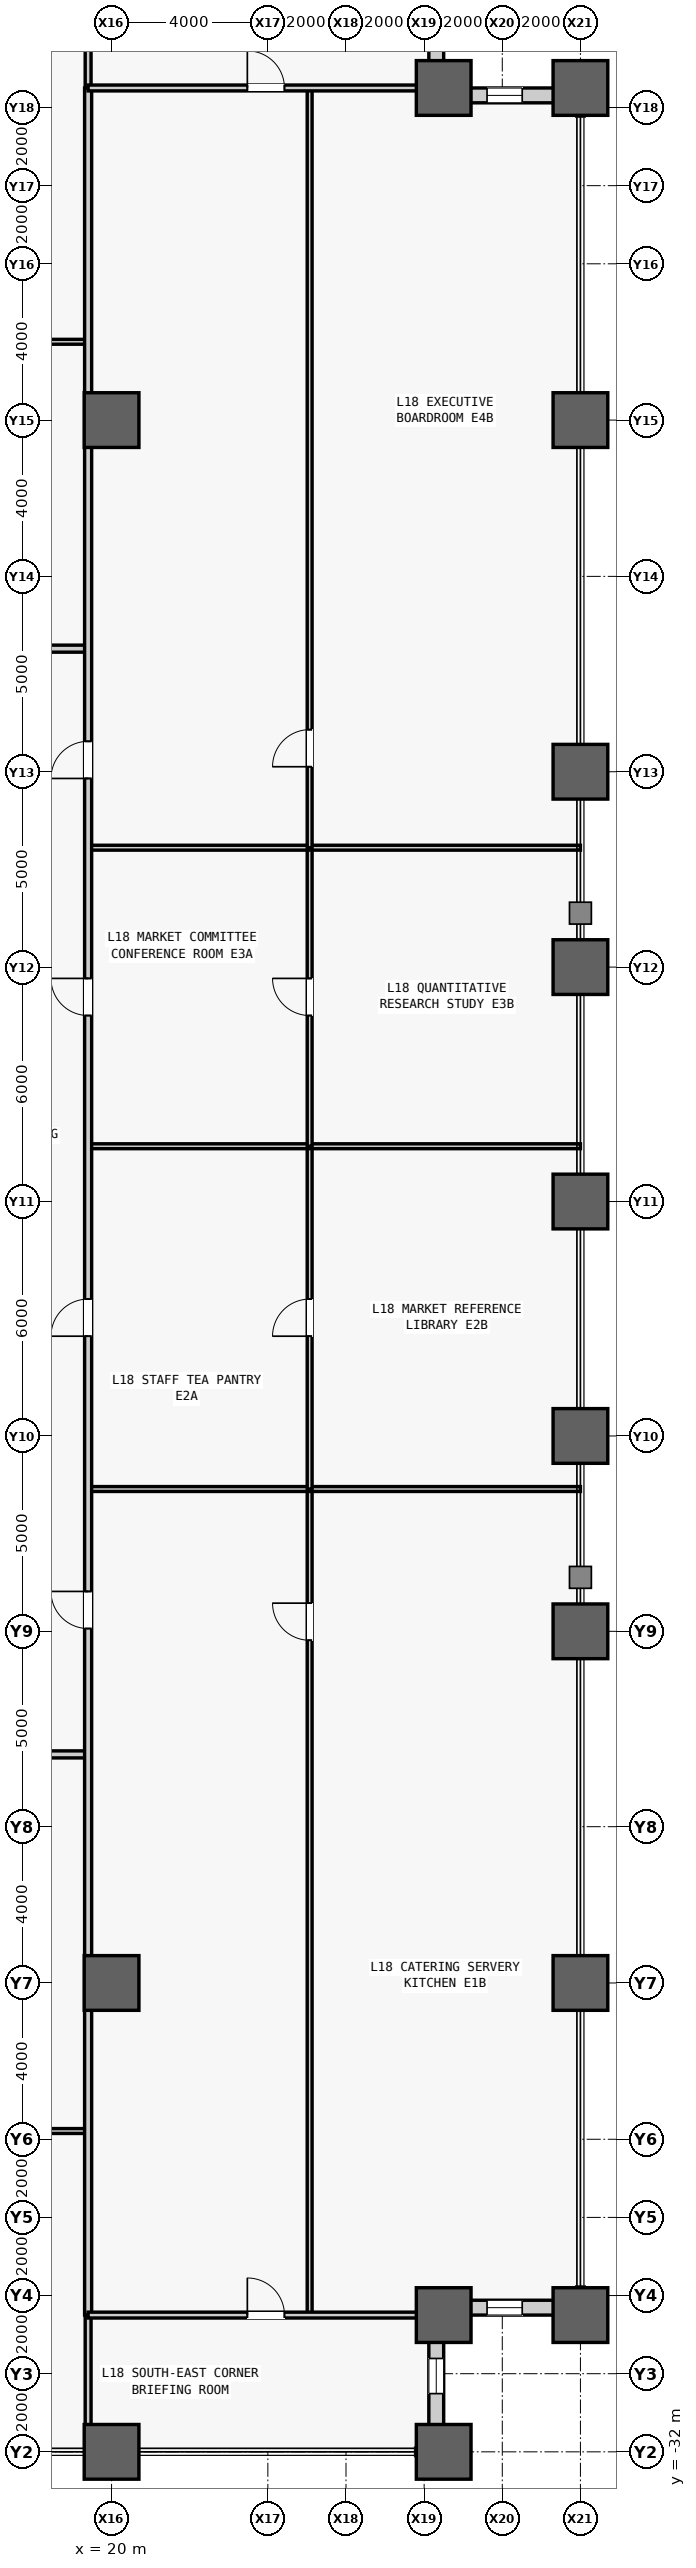
"""IFC4 building model, lengths in metres.
Left out: names, types, materials, properties, quantities, classifications, styles, units other than length and angle.
Written with IfcOpenShell. Run it as: python <this file> out.ifc"""

import sys

from ifc_helpers import new_model, si_unit, direction, frame, frame_2d, origin, origin_2d, place, context, subcontext, project, spatial, rectangle, hollow_rectangle, extrude, source, transform, mapped, element, fill, save


model = new_model("IFC4")
c1 = context("Model", 3, precision=1e-05, world=origin(), true_north=direction((0.0, 1.0)))
c2 = subcontext(c1, "Body", "Model", "MODEL_VIEW")
j1 = project(units=[si_unit("LENGTHUNIT", "METRE"), si_unit("PLANEANGLEUNIT", "RADIAN")], contexts=[c1])
p1 = place(None, origin())
s1 = spatial("IfcSite", under=j1, at=p1, CompositionType="ELEMENT")
p2 = place(p1, origin())
s2 = spatial("IfcBuilding", under=s1, at=p2, CompositionType="ELEMENT")
p3 = place(p2, frame((0.0, 0.0, 83.0)))
s3 = spatial("IfcBuildingStorey", under=s2, at=p3, CompositionType="ELEMENT", Elevation=83.0)
m1 = source(origin(), c2, "Body", "SweptSolid", [
    extrude(hollow_rectangle(XDim=1.4, YDim=1.4, WallThickness=0.075, at=origin_2d()), origin(), (0.0, 0.0, 1.0), 4.2),
])
for number, where, z_axis, x_axis in (
    (1, (20.0, -32.0, 0.0), (0.0, 0.0, 1.0), (1.0, 0.0, 0.0)),
    (2, (20.0, -20.0, 0.0), (0.0, 0.0, 1.0), (1.0, 0.0, 0.0)),
    (3, (20.0, 20.0, 0.0), (0.0, 0.0, 1.0), (1.0, 0.0, 0.0)),
    (4, (28.5, -32.0, 0.0), (0.0, 0.0, 1.0), (1.0, 0.0, 0.0)),
    (5, (28.5, -28.5, 0.0), (0.0, 0.0, 1.0), (1.0, 0.0, 0.0)),
    (6, (28.5, 28.5, 0.0), (0.0, 0.0, 1.0), (1.0, 0.0, 0.0)),
    (7, (32.0, -28.5, 0.0), (0.0, 0.0, 1.0), (1.0, 0.0, 0.0)),
    (8, (32.0, -20.0, 0.0), (0.0, 0.0, 1.0), (1.0, 0.0, 0.0)),
    (9, (32.0, -11.0, 0.0), (0.0, 0.0, 1.0), (1.0, 0.0, 0.0)),
    (10, (32.0, -6.0, 0.0), (0.0, 0.0, 1.0), (1.0, 0.0, 0.0)),
    (11, (32.0, 0.0, 0.0), (0.0, 0.0, 1.0), (1.0, 0.0, 0.0)),
    (12, (32.0, 6.0, 0.0), (0.0, 0.0, 1.0), (1.0, 0.0, 0.0)),
    (13, (32.0, 11.0, 0.0), (0.0, 0.0, 1.0), (1.0, 0.0, 0.0)),
    (14, (32.0, 20.0, 0.0), (0.0, 0.0, 1.0), (1.0, 0.0, 0.0)),
    (15, (32.0, 28.5, 0.0), (0.0, 0.0, 1.0), (1.0, 0.0, 0.0)),
):
    element("IfcColumn", number, at=place(p3, frame(where, z_axis=z_axis, x_axis=x_axis)), inside=s3, PredefinedType="COLUMN", context=c2, shape_type="MappedRepresentation", body=[
        mapped(m1, transform((0.0, 0.0, 0.0), scale=1.0)),
    ])
m2 = source(origin(), c2, "Body", "SweptSolid", [
    extrude(rectangle(XDim=3.12, YDim=0.38, at=frame_2d((1.56, 0.0))), origin(), (0.0, 0.0, 1.0), 3.245),
])
p4 = place(p3, frame((28.31, -31.62, 0.0), z_axis=(0.0, 0.0, 1.0), x_axis=(0.0, 1.0, 0.0)))
e16 = element("IfcWall", 16, at=p4, inside=s3, PredefinedType="STANDARD", context=c2, shape_type="MappedRepresentation", body=[
    mapped(m2, transform((0.0, 0.0, 0.0), scale=1.0)),
])
m3 = source(origin(), c2, "Body", "SweptSolid", [
    extrude(rectangle(XDim=0.9, YDim=2.4, at=frame_2d((0.45, 1.2))), frame((0.0, 0.2, 0.0), z_axis=(0.0, -1.0, 0.0), x_axis=(1.0, 0.0, 0.0)), (0.0, 0.0, 1.0), 0.4),
])
p5 = place(p4, frame((1.11, 0.0, 0.5)))
e17 = element("IfcOpeningElement", 17, at=p5, cuts=e16, PredefinedType="OPENING", context=c2, shape_type="MappedRepresentation", body=[
    mapped(m3, transform((0.0, 0.0, 0.0), scale=1.0)),
])
p6 = place(p3, frame((28.5, -28.31, 0.0), z_axis=(0.0, 0.0, 1.0), x_axis=(1.0, 0.0, 0.0)))
e18 = element("IfcWall", 18, at=p6, inside=s3, PredefinedType="STANDARD", context=c2, shape_type="MappedRepresentation", body=[
    mapped(m2, transform((0.0, 0.0, 0.0), scale=1.0)),
])
p7 = place(p6, frame((1.11, 0.0, 0.5)))
e19 = element("IfcOpeningElement", 19, at=p7, cuts=e18, PredefinedType="OPENING", context=c2, shape_type="MappedRepresentation", body=[
    mapped(m3, transform((0.0, 0.0, 0.0), scale=1.0)),
])
p8 = place(p3, frame((28.5, 28.31, 0.0), z_axis=(0.0, 0.0, 1.0), x_axis=(1.0, 0.0, 0.0)))
e20 = element("IfcWall", 20, at=p8, inside=s3, PredefinedType="STANDARD", context=c2, shape_type="MappedRepresentation", body=[
    mapped(m2, transform((0.0, 0.0, 0.0), scale=1.0)),
])
p9 = place(p8, frame((1.11, 0.0, 0.5)))
e21 = element("IfcOpeningElement", 21, at=p9, cuts=e20, PredefinedType="OPENING", context=c2, shape_type="MappedRepresentation", body=[
    mapped(m3, transform((0.0, 0.0, 0.0), scale=1.0)),
])
p10 = place(p3, frame((28.31, 28.5, 0.0), z_axis=(0.0, 0.0, 1.0), x_axis=(0.0, 1.0, 0.0)))
e22 = element("IfcWall", 22, at=p10, inside=s3, PredefinedType="STANDARD", context=c2, shape_type="MappedRepresentation", body=[
    mapped(m2, transform((0.0, 0.0, 0.0), scale=1.0)),
])
p11 = place(p10, frame((1.11, 0.0, 0.5)))
e23 = element("IfcOpeningElement", 23, at=p11, cuts=e22, PredefinedType="OPENING", context=c2, shape_type="MappedRepresentation", body=[
    mapped(m3, transform((0.0, 0.0, 0.0), scale=1.0)),
])
m4 = source(origin(), c2, "Body", "SweptSolid", [
    extrude(rectangle(XDim=6.072, YDim=0.125, at=frame_2d((3.036, 0.0))), origin(), (0.0, 0.0, 1.0), 3.94),
])
p12 = place(p3, frame((13.328, -23.789, 0.0), z_axis=(0.0, 0.0, 1.0), x_axis=(1.0, 0.0, 0.0)))
e24 = element("IfcWall", 24, at=p12, inside=s3, PredefinedType="PARTITIONING", context=c2, shape_type="MappedRepresentation", body=[
    mapped(m4, transform((0.0, 0.0, 0.0), scale=1.0)),
])
m5 = source(origin(), c2, "Body", "SweptSolid", [
    extrude(rectangle(XDim=0.95, YDim=2.15, at=frame_2d((0.475, 1.075))), frame((0.0, 0.073, 0.0), z_axis=(0.0, -1.0, 0.0), x_axis=(1.0, 0.0, 0.0)), (0.0, 0.0, 1.0), 0.145),
])
p13 = place(p12, frame((2.561, 0.0, 0.0)))
e25 = element("IfcOpeningElement", 25, at=p13, cuts=e24, PredefinedType="OPENING", context=c2, shape_type="MappedRepresentation", body=[
    mapped(m5, transform((0.0, 0.0, 0.0), scale=1.0)),
])
m6 = source(origin(), c2, "Body", "SweptSolid", [
    extrude(rectangle(XDim=37.95, YDim=0.18, at=frame_2d((18.975, 0.0))), origin(), (0.0, 0.0, 1.0), 3.94),
])
p14 = place(p3, frame((-18.55, -14.15, 0.0), z_axis=(0.0, 0.0, 1.0), x_axis=(1.0, 0.0, 0.0)))
e26 = element("IfcWall", 26, at=p14, inside=s3, PredefinedType="PARTITIONING", context=c2, shape_type="MappedRepresentation", body=[
    mapped(m6, transform((0.0, 0.0, 0.0), scale=1.0)),
])
m7 = source(origin(), c2, "Body", "SweptSolid", [
    extrude(rectangle(XDim=1.05, YDim=2.2, at=frame_2d((0.525, 1.1))), frame((0.0, 0.1, 0.0), z_axis=(0.0, -1.0, 0.0), x_axis=(1.0, 0.0, 0.0)), (0.0, 0.0, 1.0), 0.2),
])
p15 = place(p14, frame((4.966, 0.0, 0.0)))
e27 = element("IfcOpeningElement", 27, at=p15, cuts=e26, PredefinedType="OPENING", context=c2, shape_type="MappedRepresentation", body=[
    mapped(m7, transform((0.0, 0.0, 0.0), scale=1.0)),
])
p16 = place(p14, frame((10.291, 0.0, 0.0)))
e28 = element("IfcOpeningElement", 28, at=p16, cuts=e26, PredefinedType="OPENING", context=c2, shape_type="MappedRepresentation", body=[
    mapped(m7, transform((0.0, 0.0, 0.0), scale=1.0)),
])
p17 = place(p14, frame((18.64, 0.0, 0.0)))
e29 = element("IfcOpeningElement", 29, at=p17, cuts=e26, PredefinedType="OPENING", context=c2, shape_type="MappedRepresentation", body=[
    mapped(m7, transform((0.0, 0.0, 0.0), scale=1.0)),
])
p18 = place(p14, frame((27.178, 0.0, 0.0)))
e30 = element("IfcOpeningElement", 30, at=p18, cuts=e26, PredefinedType="OPENING", context=c2, shape_type="MappedRepresentation", body=[
    mapped(m7, transform((0.0, 0.0, 0.0), scale=1.0)),
])
m8 = source(origin(), c2, "Body", "SweptSolid", [
    extrude(rectangle(XDim=12.903, YDim=0.125, at=frame_2d((6.451, 0.0))), origin(), (0.0, 0.0, 1.0), 3.94),
])
p19 = place(p3, frame((6.497, 22.004, 0.0), z_axis=(0.0, 0.0, 1.0), x_axis=(1.0, 0.0, 0.0)))
e31 = element("IfcWall", 31, at=p19, inside=s3, PredefinedType="PARTITIONING", context=c2, shape_type="MappedRepresentation", body=[
    mapped(m8, transform((0.0, 0.0, 0.0), scale=1.0)),
])
p20 = place(p19, frame((5.977, 0.0, 0.0)))
e32 = element("IfcOpeningElement", 32, at=p20, cuts=e31, PredefinedType="OPENING", context=c2, shape_type="MappedRepresentation", body=[
    mapped(m5, transform((0.0, 0.0, 0.0), scale=1.0)),
])
p21 = place(p3, frame((-18.55, 14.15, 0.0), z_axis=(0.0, 0.0, 1.0), x_axis=(1.0, 0.0, 0.0)))
e33 = element("IfcWall", 33, at=p21, inside=s3, PredefinedType="PARTITIONING", context=c2, shape_type="MappedRepresentation", body=[
    mapped(m6, transform((0.0, 0.0, 0.0), scale=1.0)),
])
p22 = place(p21, frame((7.242, 0.0, 0.0)))
e34 = element("IfcOpeningElement", 34, at=p22, cuts=e33, PredefinedType="OPENING", context=c2, shape_type="MappedRepresentation", body=[
    mapped(m7, transform((0.0, 0.0, 0.0), scale=1.0)),
])
p23 = place(p21, frame((17.691, 0.0, 0.0)))
e35 = element("IfcOpeningElement", 35, at=p23, cuts=e33, PredefinedType="OPENING", context=c2, shape_type="MappedRepresentation", body=[
    mapped(m7, transform((0.0, 0.0, 0.0), scale=1.0)),
])
p24 = place(p21, frame((28.473, 0.0, 0.0)))
e36 = element("IfcOpeningElement", 36, at=p24, cuts=e33, PredefinedType="OPENING", context=c2, shape_type="MappedRepresentation", body=[
    mapped(m7, transform((0.0, 0.0, 0.0), scale=1.0)),
])
m9 = source(origin(), c2, "Body", "SweptSolid", [
    extrude(rectangle(XDim=3.5, YDim=0.15, at=frame_2d((1.75, 0.0))), origin(), (0.0, 0.0, 1.0), 3.94),
])
for number, where, z_axis, x_axis in (
    (37, (19.4, -32.0, 0.0), (0.0, 0.0, 1.0), (0.0, 1.0, 0.0)),
    (38, (19.4, 28.5, 0.0), (0.0, 0.0, 1.0), (0.0, 1.0, 0.0)),
):
    element("IfcWall", number, at=place(p3, frame(where, z_axis=z_axis, x_axis=x_axis)), inside=s3, PredefinedType="PARTITIONING", context=c2, shape_type="MappedRepresentation", body=[
        mapped(m9, transform((0.0, 0.0, 0.0), scale=1.0)),
    ])
m10 = source(origin(), c2, "Body", "SweptSolid", [
    extrude(rectangle(XDim=21.142, YDim=0.125, at=frame_2d((10.571, 0.0))), origin(), (0.0, 0.0, 1.0), 3.94),
])
p25 = place(p3, frame((25.07, -28.5, 0.0), z_axis=(0.0, 0.0, 1.0), x_axis=(0.0, 1.0, 0.0)))
e39 = element("IfcWall", 39, at=p25, inside=s3, PredefinedType="PARTITIONING", context=c2, shape_type="MappedRepresentation", body=[
    mapped(m10, transform((0.0, 0.0, 0.0), scale=1.0)),
])
p26 = place(p25, frame((17.271, 0.0, 0.0)))
e40 = element("IfcOpeningElement", 40, at=p26, cuts=e39, PredefinedType="OPENING", context=c2, shape_type="MappedRepresentation", body=[
    mapped(m5, transform((0.0, 0.0, 0.0), scale=1.0)),
])
m11 = source(origin(), c2, "Body", "SweptSolid", [
    extrude(rectangle(XDim=12.6, YDim=0.125, at=frame_2d((6.3, 0.0))), origin(), (0.0, 0.0, 1.0), 3.94),
])
p27 = place(p3, frame((19.4, -7.358, 0.0), z_axis=(0.0, 0.0, 1.0), x_axis=(1.0, 0.0, 0.0)))
e41 = element("IfcWall", 41, at=p27, inside=s3, PredefinedType="PARTITIONING", context=c2, shape_type="MappedRepresentation", body=[
    mapped(m11, transform((0.0, 0.0, 0.0), scale=1.0)),
])
m12 = source(origin(), c2, "Body", "SweptSolid", [
    extrude(rectangle(XDim=8.773, YDim=0.125, at=frame_2d((4.386, 0.0))), origin(), (0.0, 0.0, 1.0), 3.94),
])
p28 = place(p3, frame((25.07, -7.358, 0.0), z_axis=(0.0, 0.0, 1.0), x_axis=(0.0, 1.0, 0.0)))
e42 = element("IfcWall", 42, at=p28, inside=s3, PredefinedType="PARTITIONING", context=c2, shape_type="MappedRepresentation", body=[
    mapped(m12, transform((0.0, 0.0, 0.0), scale=1.0)),
])
p29 = place(p28, frame((3.912, 0.0, 0.0)))
e43 = element("IfcOpeningElement", 43, at=p29, cuts=e42, PredefinedType="OPENING", context=c2, shape_type="MappedRepresentation", body=[
    mapped(m5, transform((0.0, 0.0, 0.0), scale=1.0)),
])
p30 = place(p3, frame((19.4, 1.415, 0.0), z_axis=(0.0, 0.0, 1.0), x_axis=(1.0, 0.0, 0.0)))
e44 = element("IfcWall", 44, at=p30, inside=s3, PredefinedType="PARTITIONING", context=c2, shape_type="MappedRepresentation", body=[
    mapped(m11, transform((0.0, 0.0, 0.0), scale=1.0)),
])
m13 = source(origin(), c2, "Body", "SweptSolid", [
    extrude(rectangle(XDim=7.641, YDim=0.125, at=frame_2d((3.82, 0.0))), origin(), (0.0, 0.0, 1.0), 3.94),
])
p31 = place(p3, frame((25.07, 1.415, 0.0), z_axis=(0.0, 0.0, 1.0), x_axis=(0.0, 1.0, 0.0)))
e45 = element("IfcWall", 45, at=p31, inside=s3, PredefinedType="PARTITIONING", context=c2, shape_type="MappedRepresentation", body=[
    mapped(m13, transform((0.0, 0.0, 0.0), scale=1.0)),
])
p32 = place(p31, frame((3.345, 0.0, 0.0)))
e46 = element("IfcOpeningElement", 46, at=p32, cuts=e45, PredefinedType="OPENING", context=c2, shape_type="MappedRepresentation", body=[
    mapped(m5, transform((0.0, 0.0, 0.0), scale=1.0)),
])
p33 = place(p3, frame((19.4, 9.056, 0.0), z_axis=(0.0, 0.0, 1.0), x_axis=(1.0, 0.0, 0.0)))
e47 = element("IfcWall", 47, at=p33, inside=s3, PredefinedType="PARTITIONING", context=c2, shape_type="MappedRepresentation", body=[
    mapped(m11, transform((0.0, 0.0, 0.0), scale=1.0)),
])
m14 = source(origin(), c2, "Body", "SweptSolid", [
    extrude(rectangle(XDim=19.444, YDim=0.125, at=frame_2d((9.722, 0.0))), origin(), (0.0, 0.0, 1.0), 3.94),
])
p34 = place(p3, frame((25.07, 9.056, 0.0), z_axis=(0.0, 0.0, 1.0), x_axis=(0.0, 1.0, 0.0)))
e48 = element("IfcWall", 48, at=p34, inside=s3, PredefinedType="PARTITIONING", context=c2, shape_type="MappedRepresentation", body=[
    mapped(m14, transform((0.0, 0.0, 0.0), scale=1.0)),
])
p35 = place(p34, frame((2.072, 0.0, 0.0)))
e49 = element("IfcOpeningElement", 49, at=p35, cuts=e48, PredefinedType="OPENING", context=c2, shape_type="MappedRepresentation", body=[
    mapped(m5, transform((0.0, 0.0, 0.0), scale=1.0)),
])
m15 = source(origin(), c2, "Body", "SweptSolid", [
    extrude(rectangle(XDim=57.0, YDim=0.18, at=frame_2d((28.5, 0.0))), origin(), (0.0, 0.0, 1.0), 3.471),
])
p36 = place(p3, frame((19.4, -28.5, 0.0), z_axis=(0.0, 0.0, 1.0), x_axis=(0.0, 1.0, 0.0)))
e50 = element("IfcWall", 50, at=p36, inside=s3, PredefinedType="PARTITIONING", context=c2, shape_type="MappedRepresentation", body=[
    mapped(m15, transform((0.0, 0.0, 0.0), scale=1.0)),
])
m16 = source(origin(), c2, "Body", "SweptSolid", [
    extrude(rectangle(XDim=0.95, YDim=2.15, at=frame_2d((0.475, 1.075))), frame((0.0, 0.1, 0.0), z_axis=(0.0, -1.0, 0.0), x_axis=(1.0, 0.0, 0.0)), (0.0, 0.0, 1.0), 0.2),
])
p37 = place(p36, frame((17.571, 0.0, 0.0)))
e51 = element("IfcOpeningElement", 51, at=p37, cuts=e50, PredefinedType="OPENING", context=c2, shape_type="MappedRepresentation", body=[
    mapped(m16, transform((0.0, 0.0, 0.0), scale=1.0)),
])
p38 = place(p36, frame((25.053, 0.0, 0.0)))
e52 = element("IfcOpeningElement", 52, at=p38, cuts=e50, PredefinedType="OPENING", context=c2, shape_type="MappedRepresentation", body=[
    mapped(m16, transform((0.0, 0.0, 0.0), scale=1.0)),
])
p39 = place(p36, frame((33.26, 0.0, 0.0)))
e53 = element("IfcOpeningElement", 53, at=p39, cuts=e50, PredefinedType="OPENING", context=c2, shape_type="MappedRepresentation", body=[
    mapped(m16, transform((0.0, 0.0, 0.0), scale=1.0)),
])
p40 = place(p36, frame((39.328, 0.0, 0.0)))
e54 = element("IfcOpeningElement", 54, at=p40, cuts=e50, PredefinedType="OPENING", context=c2, shape_type="MappedRepresentation", body=[
    mapped(m16, transform((0.0, 0.0, 0.0), scale=1.0)),
])
m17 = source(origin(), c2, "Body", "SweptSolid", [
    extrude(rectangle(XDim=9.1, YDim=0.15, at=frame_2d((4.55, 0.0))), origin(), (0.0, 0.0, 1.0), 3.94),
])
p41 = place(p3, frame((19.4, -28.5, 0.0), z_axis=(0.0, 0.0, 1.0), x_axis=(1.0, 0.0, 0.0)))
e55 = element("IfcWall", 55, at=p41, inside=s3, PredefinedType="PARTITIONING", context=c2, shape_type="MappedRepresentation", body=[
    mapped(m17, transform((0.0, 0.0, 0.0), scale=1.0)),
])
m18 = source(origin(), c2, "Body", "SweptSolid", [
    extrude(rectangle(XDim=0.95, YDim=2.15, at=frame_2d((0.475, 1.075))), frame((0.0, 0.085, 0.0), z_axis=(0.0, -1.0, 0.0), x_axis=(1.0, 0.0, 0.0)), (0.0, 0.0, 1.0), 0.17),
])
p42 = place(p41, frame((4.075, 0.0, 0.0)))
e56 = element("IfcOpeningElement", 56, at=p42, cuts=e55, PredefinedType="OPENING", context=c2, shape_type="MappedRepresentation", body=[
    mapped(m18, transform((0.0, 0.0, 0.0), scale=1.0)),
])
p43 = place(p3, frame((19.4, 28.5, 0.0), z_axis=(0.0, 0.0, 1.0), x_axis=(1.0, 0.0, 0.0)))
e57 = element("IfcWall", 57, at=p43, inside=s3, PredefinedType="PARTITIONING", context=c2, shape_type="MappedRepresentation", body=[
    mapped(m17, transform((0.0, 0.0, 0.0), scale=1.0)),
])
p44 = place(p43, frame((4.075, 0.0, 0.0)))
e58 = element("IfcOpeningElement", 58, at=p44, cuts=e57, PredefinedType="OPENING", context=c2, shape_type="MappedRepresentation", body=[
    mapped(m18, transform((0.0, 0.0, 0.0), scale=1.0)),
])
m19 = source(origin(), c2, "Body", "SweptSolid", [
    extrude(rectangle(XDim=0.9, YDim=2.4, at=frame_2d((0.45, 1.2))), frame((0.0, 0.03, 0.0), z_axis=(0.0, -1.0, 0.0), x_axis=(1.0, 0.0, 0.0)), (0.0, 0.0, 1.0), 0.06),
])
p45 = place(p5, origin())
e59 = element("IfcWindow", 59, at=p45, inside=s3, PartitioningType="SINGLE_PANEL", PredefinedType="WINDOW", context=c2, shape_type="MappedRepresentation", body=[
    mapped(m19, transform((0.0, 0.0, 0.0), scale=1.0)),
])
fill(e17, e59)
p46 = place(p7, origin())
e60 = element("IfcWindow", 60, at=p46, inside=s3, PartitioningType="SINGLE_PANEL", PredefinedType="WINDOW", context=c2, shape_type="MappedRepresentation", body=[
    mapped(m19, transform((0.0, 0.0, 0.0), scale=1.0)),
])
fill(e19, e60)
p47 = place(p9, origin())
e61 = element("IfcWindow", 61, at=p47, inside=s3, PartitioningType="SINGLE_PANEL", PredefinedType="WINDOW", context=c2, shape_type="MappedRepresentation", body=[
    mapped(m19, transform((0.0, 0.0, 0.0), scale=1.0)),
])
fill(e21, e61)
m20 = source(origin(), c2, "Body", "SweptSolid", [
    extrude(rectangle(XDim=0.95, YDim=2.15, at=frame_2d((0.475, 1.075))), frame((0.0, 0.025, 0.0), z_axis=(0.0, -1.0, 0.0), x_axis=(1.0, 0.0, 0.0)), (0.0, 0.0, 1.0), 0.05),
])
p48 = place(p26, origin())
e62 = element("IfcDoor", 62, at=p48, inside=s3, OperationType="SINGLE_SWING_RIGHT", PredefinedType="DOOR", context=c2, shape_type="MappedRepresentation", body=[
    mapped(m20, transform((0.0, 0.0, 0.0), scale=1.0)),
])
fill(e40, e62)
p49 = place(p29, origin())
e63 = element("IfcDoor", 63, at=p49, inside=s3, OperationType="SINGLE_SWING_LEFT", PredefinedType="DOOR", context=c2, shape_type="MappedRepresentation", body=[
    mapped(m20, transform((0.0, 0.0, 0.0), scale=1.0)),
])
fill(e43, e63)
p50 = place(p32, origin())
e64 = element("IfcDoor", 64, at=p50, inside=s3, OperationType="SINGLE_SWING_RIGHT", PredefinedType="DOOR", context=c2, shape_type="MappedRepresentation", body=[
    mapped(m20, transform((0.0, 0.0, 0.0), scale=1.0)),
])
fill(e46, e64)
p51 = place(p35, origin())
e65 = element("IfcDoor", 65, at=p51, inside=s3, OperationType="SINGLE_SWING_LEFT", PredefinedType="DOOR", context=c2, shape_type="MappedRepresentation", body=[
    mapped(m20, transform((0.0, 0.0, 0.0), scale=1.0)),
])
fill(e49, e65)
p52 = place(p37, origin())
e66 = element("IfcDoor", 66, at=p52, inside=s3, OperationType="SINGLE_SWING_RIGHT", PredefinedType="DOOR", context=c2, shape_type="MappedRepresentation", body=[
    mapped(m20, transform((0.0, 0.0, 0.0), scale=1.0)),
])
fill(e51, e66)
p53 = place(p38, origin())
e67 = element("IfcDoor", 67, at=p53, inside=s3, OperationType="SINGLE_SWING_LEFT", PredefinedType="DOOR", context=c2, shape_type="MappedRepresentation", body=[
    mapped(m20, transform((0.0, 0.0, 0.0), scale=1.0)),
])
fill(e52, e67)
p54 = place(p39, origin())
e68 = element("IfcDoor", 68, at=p54, inside=s3, OperationType="SINGLE_SWING_RIGHT", PredefinedType="DOOR", context=c2, shape_type="MappedRepresentation", body=[
    mapped(m20, transform((0.0, 0.0, 0.0), scale=1.0)),
])
fill(e53, e68)
p55 = place(p40, origin())
e69 = element("IfcDoor", 69, at=p55, inside=s3, OperationType="SINGLE_SWING_LEFT", PredefinedType="DOOR", context=c2, shape_type="MappedRepresentation", body=[
    mapped(m20, transform((0.0, 0.0, 0.0), scale=1.0)),
])
fill(e54, e69)
p56 = place(p42, origin())
e70 = element("IfcDoor", 70, at=p56, inside=s3, OperationType="SINGLE_SWING_LEFT", PredefinedType="DOOR", context=c2, shape_type="MappedRepresentation", body=[
    mapped(m20, transform((0.0, 0.0, 0.0), scale=1.0)),
])
fill(e56, e70)
p57 = place(p44, origin())
e71 = element("IfcDoor", 71, at=p57, inside=s3, OperationType="SINGLE_SWING_LEFT", PredefinedType="DOOR", context=c2, shape_type="MappedRepresentation", body=[
    mapped(m20, transform((0.0, 0.0, 0.0), scale=1.0)),
])
fill(e58, e71)
save(model, sys.argv[1])
